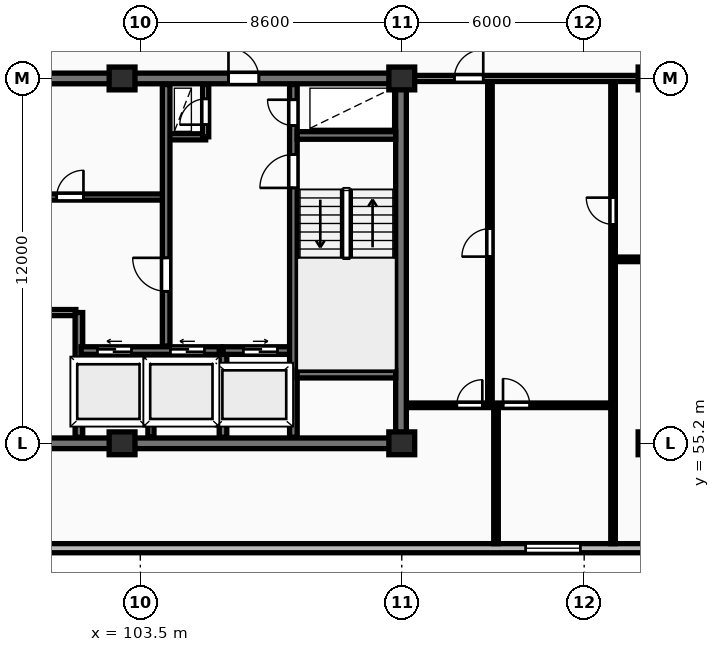
"""IFC4 building model, lengths in metres.
Left out: names, types, materials, properties, quantities, classifications, styles, units other than length and angle.
Written with IfcOpenShell. Run it as: python <this file> out.ifc"""

import sys

from ifc_helpers import new_model, si_unit, direction, frame, frame_2d, origin, origin_2d, place, context, subcontext, project, spatial, rectangle, extrude, element, fill, save


model = new_model("IFC4")
c1 = context("Model", 3, precision=1e-05, world=origin(), true_north=direction((0.0, 1.0)))
c2 = subcontext(c1, "Body", "Model", "MODEL_VIEW")
j1 = project(units=[si_unit("LENGTHUNIT", "METRE"), si_unit("PLANEANGLEUNIT", "RADIAN")], contexts=[c1])
p1 = place(None, origin())
s1 = spatial("IfcSite", under=j1, at=p1, CompositionType="ELEMENT")
p2 = place(p1, origin())
s2 = spatial("IfcBuilding", under=s1, at=p2, CompositionType="ELEMENT")
p3 = place(p2, frame((0.0, 0.0, 204.35)))
s3 = spatial("IfcBuildingStorey", under=s2, at=p3, CompositionType="ELEMENT", Elevation=204.35)
for number, where, z_axis, x_axis in (
    (1, (102.9, 55.2, 0.0), (0.0, 0.0, 1.0), (1.0, 0.0, 0.0)),
    (2, (102.9, 67.2, 0.0), (0.0, 0.0, 1.0), (1.0, 0.0, 0.0)),
    (3, (112.1, 55.2, 0.0), (0.0, 0.0, 1.0), (1.0, 0.0, 0.0)),
    (4, (112.1, 67.2, 0.0), (0.0, 0.0, 1.0), (1.0, 0.0, 0.0)),
    (5, (120.3, 55.2, 0.0), (0.0, 0.0, 1.0), (1.0, 0.0, 0.0)),
    (6, (120.3, 67.2, 0.0), (0.0, 0.0, 1.0), (1.0, 0.0, 0.0)),
):
    element("IfcColumn", number, at=place(p3, frame(where, z_axis=z_axis, x_axis=x_axis)), inside=s3, PredefinedType="COLUMN", context=c2, shape_type="SweptSolid", body=[
        extrude(rectangle(XDim=0.85, YDim=0.75, at=origin_2d()), origin(), (0.0, 0.0, 1.0), 3.25),
    ])
p4 = place(p3, frame((59.8, 51.75, 0.0), z_axis=(0.0, 0.0, 1.0), x_axis=(1.0, 0.0, 0.0)))
e7 = element("IfcWall", 7, at=p4, inside=s3, PredefinedType="STANDARD", context=c2, shape_type="SweptSolid", body=[
    extrude(rectangle(XDim=68.6, YDim=0.3, at=frame_2d((34.3, 0.0))), origin(), (0.0, 0.0, 1.0), 2.98),
])
p5 = place(p4, frame((13.025, 0.0, 0.85)))
e8 = element("IfcOpeningElement", 8, at=p5, cuts=e7, PredefinedType="OPENING", context=c2, shape_type="SweptSolid", body=[
    extrude(rectangle(XDim=1.8, YDim=1.8, at=frame_2d((0.9, 0.9))), frame((0.0, 0.16, 0.0), z_axis=(0.0, -1.0, 0.0), x_axis=(1.0, 0.0, 0.0)), (0.0, 0.0, 1.0), 0.32),
])
p6 = place(p4, frame((56.375, 0.0, 0.85)))
e9 = element("IfcOpeningElement", 9, at=p6, cuts=e7, PredefinedType="OPENING", context=c2, shape_type="SweptSolid", body=[
    extrude(rectangle(XDim=1.8, YDim=1.8, at=frame_2d((0.9, 0.9))), frame((0.0, 0.16, 0.0), z_axis=(0.0, -1.0, 0.0), x_axis=(1.0, 0.0, 0.0)), (0.0, 0.0, 1.0), 0.32),
])
p7 = place(p3, frame((75.95, 55.2, 0.0), z_axis=(0.0, 0.0, 1.0), x_axis=(1.0, 0.0, 0.0)))
e10 = element("IfcWall", 10, at=p7, inside=s3, PredefinedType="SHEAR", context=c2, shape_type="SweptSolid", body=[
    extrude(rectangle(XDim=36.3, YDim=0.35, at=frame_2d((18.15, 0.0))), origin(), (0.0, 0.0, 1.0), 3.25),
])
p8 = place(p3, frame((112.075, 55.375, 0.0), z_axis=(0.0, 0.0, 1.0), x_axis=(0.0, 1.0, 0.0)))
e11 = element("IfcWall", 11, at=p8, inside=s3, PredefinedType="SHEAR", context=c2, shape_type="SweptSolid", body=[
    extrude(rectangle(XDim=11.65, YDim=0.35, at=frame_2d((5.825, 0.0))), origin(), (0.0, 0.0, 1.0), 3.25),
])
p9 = place(p3, frame((75.95, 67.2, 0.0), z_axis=(0.0, 0.0, 1.0), x_axis=(1.0, 0.0, 0.0)))
e12 = element("IfcWall", 12, at=p9, inside=s3, PredefinedType="SHEAR", context=c2, shape_type="SweptSolid", body=[
    extrude(rectangle(XDim=36.3, YDim=0.35, at=frame_2d((18.15, 0.0))), origin(), (0.0, 0.0, 1.0), 3.25),
])
p10 = place(p9, frame((5.25, 0.0, 0.0)))
e13 = element("IfcOpeningElement", 13, at=p10, cuts=e12, PredefinedType="OPENING", context=c2, shape_type="SweptSolid", body=[
    extrude(rectangle(XDim=1.0, YDim=2.15, at=frame_2d((0.5, 1.075))), frame((0.0, 0.185, 0.0), z_axis=(0.0, -1.0, 0.0), x_axis=(1.0, 0.0, 0.0)), (0.0, 0.0, 1.0), 0.37),
])
p11 = place(p9, frame((21.6, 0.0, 0.0)))
e14 = element("IfcOpeningElement", 14, at=p11, cuts=e12, PredefinedType="OPENING", context=c2, shape_type="SweptSolid", body=[
    extrude(rectangle(XDim=1.5, YDim=2.2, at=frame_2d((0.75, 1.1))), frame((0.0, 0.185, 0.0), z_axis=(0.0, -1.0, 0.0), x_axis=(1.0, 0.0, 0.0)), (0.0, 0.0, 1.0), 0.37),
])
p12 = place(p9, frame((30.45, 0.0, 0.0)))
e15 = element("IfcOpeningElement", 15, at=p12, cuts=e12, PredefinedType="OPENING", context=c2, shape_type="SweptSolid", body=[
    extrude(rectangle(XDim=1.0, YDim=2.15, at=frame_2d((0.5, 1.075))), frame((0.0, 0.185, 0.0), z_axis=(0.0, -1.0, 0.0), x_axis=(1.0, 0.0, 0.0)), (0.0, 0.0, 1.0), 0.37),
])
p13 = place(p3, frame((93.02, 59.5, 0.0), z_axis=(0.0, 0.0, 1.0), x_axis=(1.0, 0.0, 0.0)))
e16 = element("IfcWall", 16, at=p13, inside=s3, PredefinedType="PARTITIONING", context=c2, shape_type="SweptSolid", body=[
    extrude(rectangle(XDim=8.36, YDim=0.2, at=frame_2d((4.18, 0.0))), origin(), (0.0, 0.0, 1.0), 2.98),
])
p14 = place(p13, frame((3.4, 0.0, 0.0)))
e17 = element("IfcOpeningElement", 17, at=p14, cuts=e16, PredefinedType="OPENING", context=c2, shape_type="SweptSolid", body=[
    extrude(rectangle(XDim=0.92, YDim=2.08, at=frame_2d((0.46, 1.04))), frame((0.0, 0.11, 0.0), z_axis=(0.0, -1.0, 0.0), x_axis=(1.0, 0.0, 0.0)), (0.0, 0.0, 1.0), 0.22),
])
p15 = place(p3, frame((101.48, 55.4, 0.0), z_axis=(0.0, 0.0, 1.0), x_axis=(0.0, 1.0, 0.0)))
e18 = element("IfcWall", 18, at=p15, inside=s3, PredefinedType="SHEAR", context=c2, shape_type="SweptSolid", body=[
    extrude(rectangle(XDim=4.1, YDim=0.25, at=frame_2d((2.05, 0.0))), origin(), (0.0, 0.0, 1.0), 3.25),
])
p16 = place(p3, frame((103.85, 55.4, 0.0), z_axis=(0.0, 0.0, 1.0), x_axis=(0.0, 1.0, 0.0)))
e19 = element("IfcWall", 19, at=p16, inside=s3, PredefinedType="PARTITIONING", context=c2, shape_type="SweptSolid", body=[
    extrude(rectangle(XDim=2.72, YDim=0.2, at=frame_2d((1.36, 0.0))), origin(), (0.0, 0.0, 1.0), 2.98),
])
p17 = place(p3, frame((101.55, 58.25, 0.0), z_axis=(0.0, 0.0, 1.0), x_axis=(1.0, 0.0, 0.0)))
e20 = element("IfcWall", 20, at=p17, inside=s3, PredefinedType="SHEAR", context=c2, shape_type="SweptSolid", body=[
    extrude(rectangle(XDim=4.6, YDim=0.25, at=frame_2d((2.3, 0.0))), origin(), (0.0, 0.0, 1.0), 3.25),
])
p18 = place(p17, frame((0.54, 0.0, 0.0)))
e21 = element("IfcOpeningElement", 21, at=p18, cuts=e20, PredefinedType="OPENING", context=c2, shape_type="SweptSolid", body=[
    extrude(rectangle(XDim=1.12, YDim=2.12, at=frame_2d((0.56, 1.06))), frame((0.0, 0.135, 0.0), z_axis=(0.0, -1.0, 0.0), x_axis=(1.0, 0.0, 0.0)), (0.0, 0.0, 1.0), 0.27),
])
p19 = place(p17, frame((2.94, 0.0, 0.0)))
e22 = element("IfcOpeningElement", 22, at=p19, cuts=e20, PredefinedType="OPENING", context=c2, shape_type="SweptSolid", body=[
    extrude(rectangle(XDim=1.12, YDim=2.12, at=frame_2d((0.56, 1.06))), frame((0.0, 0.135, 0.0), z_axis=(0.0, -1.0, 0.0), x_axis=(1.0, 0.0, 0.0)), (0.0, 0.0, 1.0), 0.27),
])
p20 = place(p3, frame((106.22, 55.4, 0.0), z_axis=(0.0, 0.0, 1.0), x_axis=(0.0, 1.0, 0.0)))
e23 = element("IfcWall", 23, at=p20, inside=s3, PredefinedType="SHEAR", context=c2, shape_type="SweptSolid", body=[
    extrude(rectangle(XDim=2.85, YDim=0.25, at=frame_2d((1.425, 0.0))), origin(), (0.0, 0.0, 1.0), 3.25),
])
p21 = place(p3, frame((106.22, 58.25, 0.0), z_axis=(0.0, 0.0, 1.0), x_axis=(1.0, 0.0, 0.0)))
e24 = element("IfcWall", 24, at=p21, inside=s3, PredefinedType="SHEAR", context=c2, shape_type="SweptSolid", body=[
    extrude(rectangle(XDim=2.46, YDim=0.25, at=frame_2d((1.23, 0.0))), origin(), (0.0, 0.0, 1.0), 3.25),
])
p22 = place(p21, frame((0.67, 0.0, 0.0)))
e25 = element("IfcOpeningElement", 25, at=p22, cuts=e24, PredefinedType="OPENING", context=c2, shape_type="SweptSolid", body=[
    extrude(rectangle(XDim=1.12, YDim=2.12, at=frame_2d((0.56, 1.06))), frame((0.0, 0.135, 0.0), z_axis=(0.0, -1.0, 0.0), x_axis=(1.0, 0.0, 0.0)), (0.0, 0.0, 1.0), 0.27),
])
p23 = place(p3, frame((84.42, 63.3, 0.0), z_axis=(0.0, 0.0, 1.0), x_axis=(1.0, 0.0, 0.0)))
e26 = element("IfcWall", 26, at=p23, inside=s3, PredefinedType="PARTITIONING", context=c2, shape_type="SweptSolid", body=[
    extrude(rectangle(XDim=19.83, YDim=0.2, at=frame_2d((9.915, 0.0))), origin(), (0.0, 0.0, 1.0), 2.98),
])
p24 = place(p23, frame((1.15, 0.0, 0.0)))
e27 = element("IfcOpeningElement", 27, at=p24, cuts=e26, PredefinedType="OPENING", context=c2, shape_type="SweptSolid", body=[
    extrude(rectangle(XDim=0.85, YDim=2.05, at=frame_2d((0.425, 1.025))), frame((0.0, 0.11, 0.0), z_axis=(0.0, -1.0, 0.0), x_axis=(1.0, 0.0, 0.0)), (0.0, 0.0, 1.0), 0.22),
])
p25 = place(p23, frame((3.25, 0.0, 0.0)))
e28 = element("IfcOpeningElement", 28, at=p25, cuts=e26, PredefinedType="OPENING", context=c2, shape_type="SweptSolid", body=[
    extrude(rectangle(XDim=0.85, YDim=2.05, at=frame_2d((0.425, 1.025))), frame((0.0, 0.11, 0.0), z_axis=(0.0, -1.0, 0.0), x_axis=(1.0, 0.0, 0.0)), (0.0, 0.0, 1.0), 0.22),
])
p26 = place(p23, frame((13.08, 0.0, 0.0)))
e29 = element("IfcOpeningElement", 29, at=p26, cuts=e26, PredefinedType="OPENING", context=c2, shape_type="SweptSolid", body=[
    extrude(rectangle(XDim=1.5, YDim=2.2, at=frame_2d((0.75, 1.1))), frame((0.0, 0.11, 0.0), z_axis=(0.0, -1.0, 0.0), x_axis=(1.0, 0.0, 0.0)), (0.0, 0.0, 1.0), 0.22),
])
p27 = place(p23, frame((6.68, 0.0, 0.0)))
e30 = element("IfcOpeningElement", 30, at=p27, cuts=e26, PredefinedType="OPENING", context=c2, shape_type="SweptSolid", body=[
    extrude(rectangle(XDim=0.92, YDim=2.08, at=frame_2d((0.46, 1.04))), frame((0.0, 0.11, 0.0), z_axis=(0.0, -1.0, 0.0), x_axis=(1.0, 0.0, 0.0)), (0.0, 0.0, 1.0), 0.22),
])
p28 = place(p23, frame((16.33, 0.0, 0.0)))
e31 = element("IfcOpeningElement", 31, at=p28, cuts=e26, PredefinedType="OPENING", context=c2, shape_type="SweptSolid", body=[
    extrude(rectangle(XDim=0.88, YDim=2.06, at=frame_2d((0.44, 1.03))), frame((0.0, 0.11, 0.0), z_axis=(0.0, -1.0, 0.0), x_axis=(1.0, 0.0, 0.0)), (0.0, 0.0, 1.0), 0.22),
])
p29 = place(p3, frame((104.45, 65.28, 0.0), z_axis=(0.0, 0.0, 1.0), x_axis=(1.0, 0.0, 0.0)))
e32 = element("IfcWall", 32, at=p29, inside=s3, PredefinedType="PARTITIONING", context=c2, shape_type="SweptSolid", body=[
    extrude(rectangle(XDim=1.2, YDim=0.2, at=frame_2d((0.6, 0.0))), origin(), (0.0, 0.0, 1.0), 2.98),
])
p30 = place(p3, frame((105.65, 65.28, 0.0), z_axis=(0.0, 0.0, 1.0), x_axis=(0.0, 1.0, 0.0)))
e33 = element("IfcWall", 33, at=p30, inside=s3, PredefinedType="PARTITIONING", context=c2, shape_type="SweptSolid", body=[
    extrude(rectangle(XDim=1.72, YDim=0.2, at=frame_2d((0.86, 0.0))), origin(), (0.0, 0.0, 1.0), 2.98),
])
p31 = place(p30, frame((0.4, 0.0, 0.0)))
e34 = element("IfcOpeningElement", 34, at=p31, cuts=e33, PredefinedType="OPENING", context=c2, shape_type="SweptSolid", body=[
    extrude(rectangle(XDim=0.85, YDim=2.05, at=frame_2d((0.425, 1.025))), frame((0.0, 0.11, 0.0), z_axis=(0.0, -1.0, 0.0), x_axis=(1.0, 0.0, 0.0)), (0.0, 0.0, 1.0), 0.22),
])
p32 = place(p3, frame((104.35, 58.4, 0.0), z_axis=(0.0, 0.0, 1.0), x_axis=(0.0, 1.0, 0.0)))
e35 = element("IfcWall", 35, at=p32, inside=s3, PredefinedType="SHEAR", context=c2, shape_type="SweptSolid", body=[
    extrude(rectangle(XDim=8.6, YDim=0.25, at=frame_2d((4.3, 0.0))), origin(), (0.0, 0.0, 1.0), 3.25),
])
p33 = place(p32, frame((1.8, 0.0, 0.0)))
e36 = element("IfcOpeningElement", 36, at=p33, cuts=e35, PredefinedType="OPENING", context=c2, shape_type="SweptSolid", body=[
    extrude(rectangle(XDim=1.1, YDim=2.1, at=frame_2d((0.55, 1.05))), frame((0.0, 0.135, 0.0), z_axis=(0.0, -1.0, 0.0), x_axis=(1.0, 0.0, 0.0)), (0.0, 0.0, 1.0), 0.27),
])
p34 = place(p3, frame((108.535, 55.4, 0.0), z_axis=(0.0, 0.0, 1.0), x_axis=(0.0, 1.0, 0.0)))
e37 = element("IfcWall", 37, at=p34, inside=s3, PredefinedType="SHEAR", context=c2, shape_type="SweptSolid", body=[
    extrude(rectangle(XDim=11.6, YDim=0.25, at=frame_2d((5.8, 0.0))), origin(), (0.0, 0.0, 1.0), 3.25),
])
p35 = place(p34, frame((8.2, 0.0, 0.0)))
e38 = element("IfcOpeningElement", 38, at=p35, cuts=e37, PredefinedType="OPENING", context=c2, shape_type="SweptSolid", body=[
    extrude(rectangle(XDim=1.1, YDim=2.1, at=frame_2d((0.55, 1.05))), frame((0.0, 0.135, 0.0), z_axis=(0.0, -1.0, 0.0), x_axis=(1.0, 0.0, 0.0)), (0.0, 0.0, 1.0), 0.27),
])
p36 = place(p34, frame((10.25, 0.0, 0.0)))
e39 = element("IfcOpeningElement", 39, at=p36, cuts=e37, PredefinedType="OPENING", context=c2, shape_type="SweptSolid", body=[
    extrude(rectangle(XDim=0.85, YDim=2.05, at=frame_2d((0.425, 1.025))), frame((0.0, 0.135, 0.0), z_axis=(0.0, -1.0, 0.0), x_axis=(1.0, 0.0, 0.0)), (0.0, 0.0, 1.0), 0.27),
])
for number, where, z_axis, x_axis in (
    (40, (108.66, 57.475, 0.0), (0.0, 0.0, 1.0), (1.0, 0.0, 0.0)),
    (41, (108.66, 65.325, 0.0), (0.0, 0.0, 1.0), (1.0, 0.0, 0.0)),
):
    element("IfcWall", number, at=place(p3, frame(where, z_axis=z_axis, x_axis=x_axis)), inside=s3, PredefinedType="SHEAR", context=c2, shape_type="SweptSolid", body=[
        extrude(rectangle(XDim=3.24, YDim=0.25, at=frame_2d((1.62, 0.0))), origin(), (0.0, 0.0, 1.0), 3.25),
    ])
p37 = place(p3, frame((119.05, 61.25, 0.0), z_axis=(0.0, 0.0, 1.0), x_axis=(1.0, 0.0, 0.0)))
e42 = element("IfcWall", 42, at=p37, inside=s3, PredefinedType="PARTITIONING", context=c2, shape_type="SweptSolid", body=[
    extrude(rectangle(XDim=9.35, YDim=0.15, at=frame_2d((4.675, 0.0))), origin(), (0.0, 0.0, 1.0), 2.98),
])
p38 = place(p37, frame((4.255, 0.0, 0.0)))
e43 = element("IfcOpeningElement", 43, at=p38, cuts=e42, PredefinedType="OPENING", context=c2, shape_type="SweptSolid", body=[
    extrude(rectangle(XDim=0.84, YDim=2.04, at=frame_2d((0.42, 1.02))), frame((0.0, 0.085, 0.0), z_axis=(0.0, -1.0, 0.0), x_axis=(1.0, 0.0, 0.0)), (0.0, 0.0, 1.0), 0.17),
])
p39 = place(p3, frame((119.05, 51.9, 0.0), z_axis=(0.0, 0.0, 1.0), x_axis=(0.0, 1.0, 0.0)))
e44 = element("IfcWall", 44, at=p39, inside=s3, PredefinedType="PARTITIONING", context=c2, shape_type="SweptSolid", body=[
    extrude(rectangle(XDim=15.25, YDim=0.15, at=frame_2d((7.625, 0.0))), origin(), (0.0, 0.0, 1.0), 2.98),
])
p40 = place(p39, frame((10.5, 0.0, 0.0)))
e45 = element("IfcOpeningElement", 45, at=p40, cuts=e44, PredefinedType="OPENING", context=c2, shape_type="SweptSolid", body=[
    extrude(rectangle(XDim=0.88, YDim=2.06, at=frame_2d((0.44, 1.03))), frame((0.0, 0.085, 0.0), z_axis=(0.0, -1.0, 0.0), x_axis=(1.0, 0.0, 0.0)), (0.0, 0.0, 1.0), 0.17),
])
p41 = place(p3, frame((115.0, 56.45, 0.0), z_axis=(0.0, 0.0, 1.0), x_axis=(0.0, 1.0, 0.0)))
e46 = element("IfcWall", 46, at=p41, inside=s3, PredefinedType="PARTITIONING", context=c2, shape_type="SweptSolid", body=[
    extrude(rectangle(XDim=10.7, YDim=0.15, at=frame_2d((5.35, 0.0))), origin(), (0.0, 0.0, 1.0), 2.98),
])
p42 = place(p41, frame((4.89, 0.0, 0.0)))
e47 = element("IfcOpeningElement", 47, at=p42, cuts=e46, PredefinedType="OPENING", context=c2, shape_type="SweptSolid", body=[
    extrude(rectangle(XDim=0.92, YDim=2.08, at=frame_2d((0.46, 1.04))), frame((0.0, 0.085, 0.0), z_axis=(0.0, -1.0, 0.0), x_axis=(1.0, 0.0, 0.0)), (0.0, 0.0, 1.0), 0.17),
])
p43 = place(p3, frame((115.2, 51.9, 0.0), z_axis=(0.0, 0.0, 1.0), x_axis=(0.0, 1.0, 0.0)))
e48 = element("IfcWall", 48, at=p43, inside=s3, PredefinedType="PARTITIONING", context=c2, shape_type="SweptSolid", body=[
    extrude(rectangle(XDim=4.55, YDim=0.15, at=frame_2d((2.275, 0.0))), origin(), (0.0, 0.0, 1.0), 2.98),
])
p44 = place(p3, frame((112.27, 56.45, 0.0), z_axis=(0.0, 0.0, 1.0), x_axis=(1.0, 0.0, 0.0)))
e49 = element("IfcWall", 49, at=p44, inside=s3, PredefinedType="PARTITIONING", context=c2, shape_type="SweptSolid", body=[
    extrude(rectangle(XDim=6.76, YDim=0.15, at=frame_2d((3.38, 0.0))), origin(), (0.0, 0.0, 1.0), 2.98),
])
p45 = place(p44, frame((1.64, 0.0, 0.0)))
e50 = element("IfcOpeningElement", 50, at=p45, cuts=e49, PredefinedType="OPENING", context=c2, shape_type="SweptSolid", body=[
    extrude(rectangle(XDim=0.84, YDim=2.04, at=frame_2d((0.42, 1.02))), frame((0.0, 0.085, 0.0), z_axis=(0.0, -1.0, 0.0), x_axis=(1.0, 0.0, 0.0)), (0.0, 0.0, 1.0), 0.17),
])
p46 = place(p44, frame((3.16, 0.0, 0.0)))
e51 = element("IfcOpeningElement", 51, at=p46, cuts=e49, PredefinedType="OPENING", context=c2, shape_type="SweptSolid", body=[
    extrude(rectangle(XDim=0.88, YDim=2.06, at=frame_2d((0.44, 1.03))), frame((0.0, 0.085, 0.0), z_axis=(0.0, -1.0, 0.0), x_axis=(1.0, 0.0, 0.0)), (0.0, 0.0, 1.0), 0.17),
])
p47 = place(p3, frame((112.25, 67.2, 0.0), z_axis=(0.0, 0.0, 1.0), x_axis=(1.0, 0.0, 0.0)))
e52 = element("IfcWall", 52, at=p47, inside=s3, PredefinedType="PARTITIONING", context=c2, shape_type="SweptSolid", body=[
    extrude(rectangle(XDim=16.15, YDim=0.2, at=frame_2d((8.075, 0.0))), origin(), (0.0, 0.0, 1.0), 2.443),
])
p48 = place(p47, frame((1.58, 0.0, 0.0)))
e53 = element("IfcOpeningElement", 53, at=p48, cuts=e52, PredefinedType="OPENING", context=c2, shape_type="SweptSolid", body=[
    extrude(rectangle(XDim=0.95, YDim=2.15, at=frame_2d((0.475, 1.075))), frame((0.0, 0.11, 0.0), z_axis=(0.0, -1.0, 0.0), x_axis=(1.0, 0.0, 0.0)), (0.0, 0.0, 1.0), 0.22),
])
p49 = place(p6, origin())
e54 = element("IfcWindow", 54, at=p49, inside=s3, PartitioningType="SINGLE_PANEL", PredefinedType="WINDOW", context=c2, shape_type="SweptSolid", body=[
    extrude(rectangle(XDim=1.8, YDim=1.8, at=frame_2d((0.9, 0.9))), frame((0.0, 0.03, 0.0), z_axis=(0.0, -1.0, 0.0), x_axis=(1.0, 0.0, 0.0)), (0.0, 0.0, 1.0), 0.06),
])
fill(e9, e54)
p50 = place(p12, origin())
e55 = element("IfcDoor", 55, at=p50, inside=s3, OperationType="SINGLE_SWING_LEFT", PredefinedType="DOOR", context=c2, shape_type="SweptSolid", body=[
    extrude(rectangle(XDim=1.0, YDim=2.15, at=frame_2d((0.5, 1.075))), frame((0.0, 0.025, 0.0), z_axis=(0.0, -1.0, 0.0), x_axis=(1.0, 0.0, 0.0)), (0.0, 0.0, 1.0), 0.05),
])
fill(e15, e55)
p51 = place(p18, origin())
e56 = element("IfcDoor", 56, at=p51, inside=s3, OperationType="SLIDING_TO_LEFT", PredefinedType="DOOR", context=c2, shape_type="SweptSolid", body=[
    extrude(rectangle(XDim=1.12, YDim=2.12, at=frame_2d((0.56, 1.06))), frame((0.0, 0.025, 0.0), z_axis=(0.0, -1.0, 0.0), x_axis=(1.0, 0.0, 0.0)), (0.0, 0.0, 1.0), 0.05),
])
fill(e21, e56)
p52 = place(p19, origin())
e57 = element("IfcDoor", 57, at=p52, inside=s3, OperationType="SLIDING_TO_LEFT", PredefinedType="DOOR", context=c2, shape_type="SweptSolid", body=[
    extrude(rectangle(XDim=1.12, YDim=2.12, at=frame_2d((0.56, 1.06))), frame((0.0, 0.025, 0.0), z_axis=(0.0, -1.0, 0.0), x_axis=(1.0, 0.0, 0.0)), (0.0, 0.0, 1.0), 0.05),
])
fill(e22, e57)
p53 = place(p22, origin())
e58 = element("IfcDoor", 58, at=p53, inside=s3, OperationType="SLIDING_TO_RIGHT", PredefinedType="DOOR", context=c2, shape_type="SweptSolid", body=[
    extrude(rectangle(XDim=1.12, YDim=2.12, at=frame_2d((0.56, 1.06))), frame((0.0, 0.025, 0.0), z_axis=(0.0, -1.0, 0.0), x_axis=(1.0, 0.0, 0.0)), (0.0, 0.0, 1.0), 0.05),
])
fill(e25, e58)
p54 = place(p28, origin())
e59 = element("IfcDoor", 59, at=p54, inside=s3, OperationType="SINGLE_SWING_RIGHT", PredefinedType="DOOR", context=c2, shape_type="SweptSolid", body=[
    extrude(rectangle(XDim=0.88, YDim=2.06, at=frame_2d((0.44, 1.03))), frame((0.0, 0.025, 0.0), z_axis=(0.0, -1.0, 0.0), x_axis=(1.0, 0.0, 0.0)), (0.0, 0.0, 1.0), 0.05),
])
fill(e31, e59)
p55 = place(p31, origin())
e60 = element("IfcDoor", 60, at=p55, inside=s3, OperationType="SINGLE_SWING_LEFT", PredefinedType="DOOR", context=c2, shape_type="SweptSolid", body=[
    extrude(rectangle(XDim=0.85, YDim=2.05, at=frame_2d((0.425, 1.025))), frame((0.0, 0.025, 0.0), z_axis=(0.0, -1.0, 0.0), x_axis=(1.0, 0.0, 0.0)), (0.0, 0.0, 1.0), 0.05),
])
fill(e34, e60)
p56 = place(p33, origin())
e61 = element("IfcDoor", 61, at=p56, inside=s3, OperationType="SINGLE_SWING_RIGHT", PredefinedType="DOOR", context=c2, shape_type="SweptSolid", body=[
    extrude(rectangle(XDim=1.1, YDim=2.1, at=frame_2d((0.55, 1.05))), frame((0.0, 0.025, 0.0), z_axis=(0.0, -1.0, 0.0), x_axis=(1.0, 0.0, 0.0)), (0.0, 0.0, 1.0), 0.05),
])
fill(e36, e61)
p57 = place(p35, origin())
e62 = element("IfcDoor", 62, at=p57, inside=s3, OperationType="SINGLE_SWING_LEFT", PredefinedType="DOOR", context=c2, shape_type="SweptSolid", body=[
    extrude(rectangle(XDim=1.1, YDim=2.1, at=frame_2d((0.55, 1.05))), frame((0.0, 0.025, 0.0), z_axis=(0.0, -1.0, 0.0), x_axis=(1.0, 0.0, 0.0)), (0.0, 0.0, 1.0), 0.05),
])
fill(e38, e62)
p58 = place(p36, origin())
e63 = element("IfcDoor", 63, at=p58, inside=s3, OperationType="SINGLE_SWING_RIGHT", PredefinedType="DOOR", context=c2, shape_type="SweptSolid", body=[
    extrude(rectangle(XDim=0.85, YDim=2.05, at=frame_2d((0.425, 1.025))), frame((0.0, 0.025, 0.0), z_axis=(0.0, -1.0, 0.0), x_axis=(1.0, 0.0, 0.0)), (0.0, 0.0, 1.0), 0.05),
])
fill(e39, e63)
p59 = place(p40, origin())
e64 = element("IfcDoor", 64, at=p59, inside=s3, OperationType="SINGLE_SWING_RIGHT", PredefinedType="DOOR", context=c2, shape_type="SweptSolid", body=[
    extrude(rectangle(XDim=0.88, YDim=2.06, at=frame_2d((0.44, 1.03))), frame((0.0, 0.025, 0.0), z_axis=(0.0, -1.0, 0.0), x_axis=(1.0, 0.0, 0.0)), (0.0, 0.0, 1.0), 0.05),
])
fill(e45, e64)
p60 = place(p42, origin())
e65 = element("IfcDoor", 65, at=p60, inside=s3, OperationType="SINGLE_SWING_LEFT", PredefinedType="DOOR", context=c2, shape_type="SweptSolid", body=[
    extrude(rectangle(XDim=0.92, YDim=2.08, at=frame_2d((0.46, 1.04))), frame((0.0, 0.025, 0.0), z_axis=(0.0, -1.0, 0.0), x_axis=(1.0, 0.0, 0.0)), (0.0, 0.0, 1.0), 0.05),
])
fill(e47, e65)
p61 = place(p45, origin())
e66 = element("IfcDoor", 66, at=p61, inside=s3, OperationType="SINGLE_SWING_RIGHT", PredefinedType="DOOR", context=c2, shape_type="SweptSolid", body=[
    extrude(rectangle(XDim=0.84, YDim=2.04, at=frame_2d((0.42, 1.02))), frame((0.0, 0.025, 0.0), z_axis=(0.0, -1.0, 0.0), x_axis=(1.0, 0.0, 0.0)), (0.0, 0.0, 1.0), 0.05),
])
fill(e50, e66)
p62 = place(p46, origin())
e67 = element("IfcDoor", 67, at=p62, inside=s3, OperationType="SINGLE_SWING_LEFT", PredefinedType="DOOR", context=c2, shape_type="SweptSolid", body=[
    extrude(rectangle(XDim=0.88, YDim=2.06, at=frame_2d((0.44, 1.03))), frame((0.0, 0.025, 0.0), z_axis=(0.0, -1.0, 0.0), x_axis=(1.0, 0.0, 0.0)), (0.0, 0.0, 1.0), 0.05),
])
fill(e51, e67)
p63 = place(p48, origin())
e68 = element("IfcDoor", 68, at=p63, inside=s3, OperationType="SINGLE_SWING_RIGHT", PredefinedType="DOOR", context=c2, shape_type="SweptSolid", body=[
    extrude(rectangle(XDim=0.95, YDim=2.15, at=frame_2d((0.475, 1.075))), frame((0.0, 0.025, 0.0), z_axis=(0.0, -1.0, 0.0), x_axis=(1.0, 0.0, 0.0)), (0.0, 0.0, 1.0), 0.05),
])
fill(e53, e68)
save(model, sys.argv[1])
